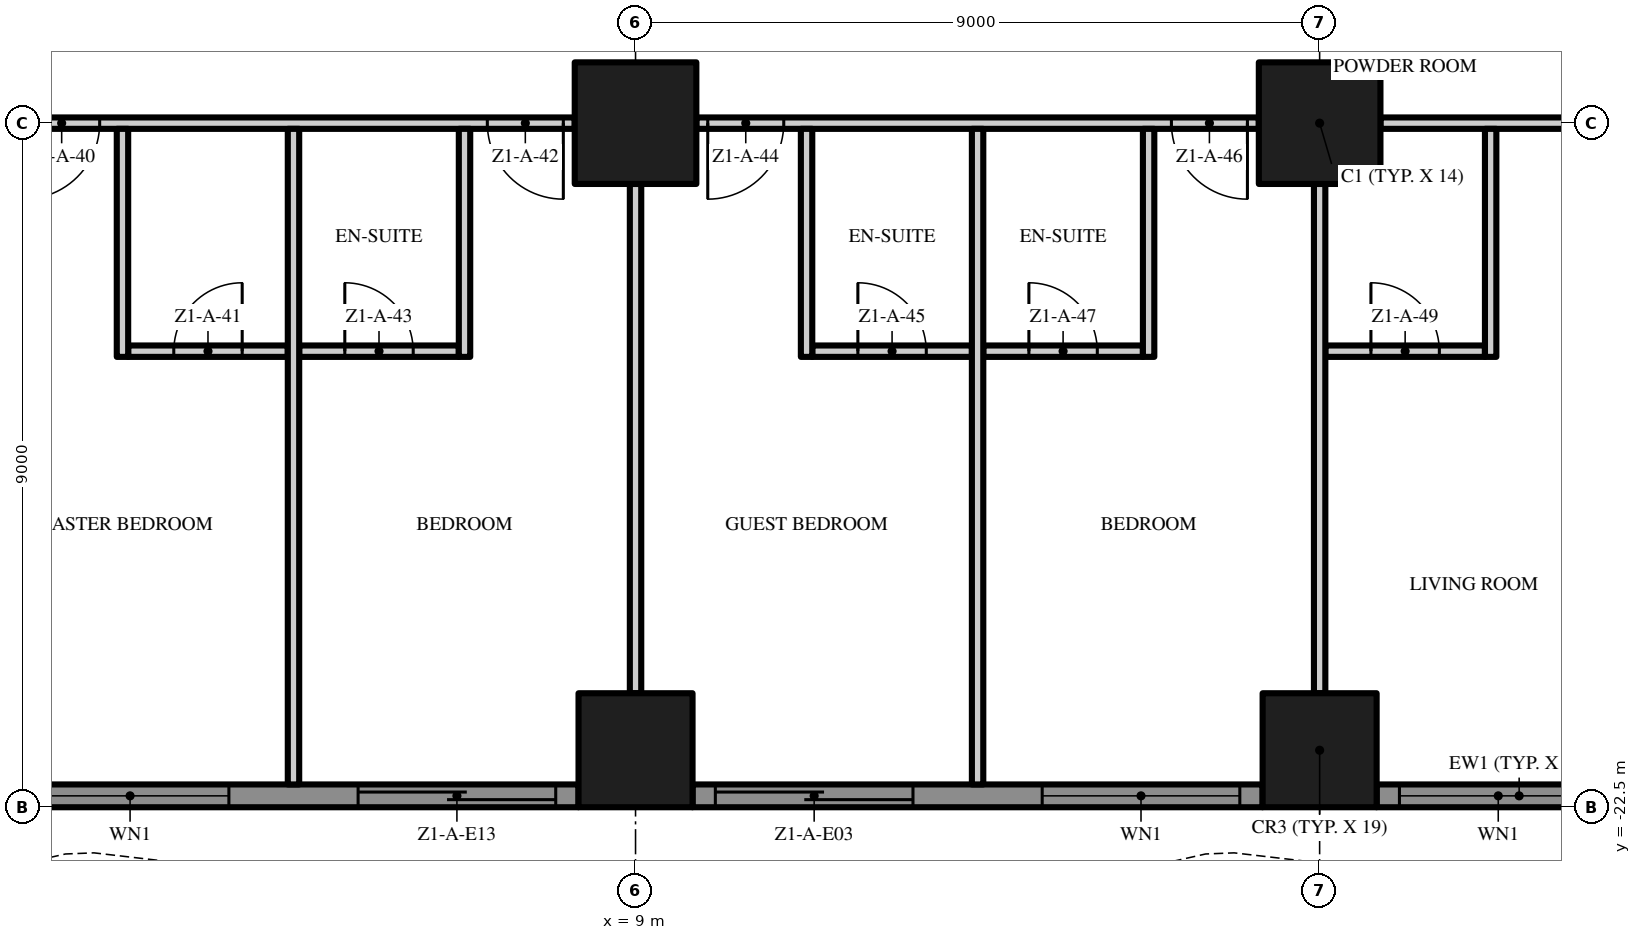
"""IFC4 building model, lengths in metres.
Left out: names, types, materials, properties, quantities, classifications, styles, units other than length and angle.
Written with IfcOpenShell. Run it as: python <this file> out.ifc"""

import sys

from ifc_helpers import new_model, si_unit, direction, frame, frame_2d, origin, origin_2d, place, context, subcontext, project, spatial, polyline, rectangle, outline, extrude, element, fill, save


model = new_model("IFC4")
c1 = context("Model", 3, precision=1e-05, world=origin(), true_north=direction((0.0, 1.0)))
c2 = subcontext(c1, "Body", "Model", "MODEL_VIEW")
j1 = project(units=[si_unit("LENGTHUNIT", "METRE"), si_unit("PLANEANGLEUNIT", "RADIAN")], contexts=[c1])
p1 = place(None, origin())
s1 = spatial("IfcSite", under=j1, at=p1, CompositionType="ELEMENT")
p2 = place(p1, origin())
s2 = spatial("IfcBuilding", under=s1, at=p2, CompositionType="ELEMENT")
p3 = place(p2, frame((0.0, 0.0, 18.8)))
s3 = spatial("IfcBuildingStorey", under=s2, at=p3, CompositionType="ELEMENT", Elevation=18.8)
p4 = place(p3, frame((18.0, -13.5, 0.0), z_axis=(0.0, 0.0, 1.0), x_axis=(1.0, 0.0, 0.0)))
e1 = element("IfcColumn", 1, at=p4, inside=s3, PredefinedType="COLUMN", context=c2, shape_type="SweptSolid", body=[
    extrude(rectangle(XDim=1.6, YDim=1.6, at=origin_2d()), origin(), (0.0, 0.0, 1.0), 3.5),
])
p5 = place(p3, frame((18.0, -21.75, 0.0), z_axis=(0.0, 0.0, 1.0), x_axis=(1.0, 0.0, 0.0)))
e2 = element("IfcColumn", 2, at=p5, inside=s3, PredefinedType="COLUMN", context=c2, shape_type="SweptSolid", body=[
    extrude(rectangle(XDim=1.5, YDim=1.5, at=origin_2d()), origin(), (0.0, 0.0, 1.0), 3.5),
])
p6 = place(p3, frame((9.0, -13.5, 0.0), z_axis=(0.0, 0.0, 1.0), x_axis=(1.0, 0.0, 0.0)))
e3 = element("IfcColumn", 3, at=p6, inside=s3, PredefinedType="COLUMN", context=c2, shape_type="SweptSolid", body=[
    extrude(rectangle(XDim=1.6, YDim=1.6, at=origin_2d()), origin(), (0.0, 0.0, 1.0), 3.5),
])
p7 = place(p3, frame((9.0, -21.75, 0.0), z_axis=(0.0, 0.0, 1.0), x_axis=(1.0, 0.0, 0.0)))
e4 = element("IfcColumn", 4, at=p7, inside=s3, PredefinedType="COLUMN", context=c2, shape_type="SweptSolid", body=[
    extrude(rectangle(XDim=1.5, YDim=1.5, at=origin_2d()), origin(), (0.0, 0.0, 1.0), 3.5),
])
p8 = place(p3, frame((8.25, -22.35, 0.0), z_axis=(0.0, 0.0, 1.0), x_axis=(-1.0, 0.0, 0.0)))
e5 = element("IfcWall", 5, at=p8, inside=s3, PredefinedType="SOLIDWALL", context=c2, shape_type="SweptSolid", body=[
    extrude(rectangle(XDim=7.5, YDim=0.3, at=frame_2d((3.75, 0.0))), origin(), (0.0, 0.0, 1.0), 3.5),
])
p9 = place(p8, frame((4.6, 0.0, 0.45)))
e6 = element("IfcOpeningElement", 6, at=p9, cuts=e5, PredefinedType="OPENING", context=c2, shape_type="SweptSolid", body=[
    extrude(rectangle(XDim=2.6, YDim=2.65, at=frame_2d((1.3, 1.325))), frame((0.0, 0.16, 0.0), z_axis=(0.0, -1.0, 0.0), x_axis=(1.0, 0.0, 0.0)), (0.0, 0.0, 1.0), 0.32),
])
p10 = place(p8, frame((0.3, 0.0, 0.0)))
e7 = element("IfcOpeningElement", 7, at=p10, cuts=e5, PredefinedType="OPENING", context=c2, shape_type="SweptSolid", body=[
    extrude(rectangle(XDim=2.6, YDim=2.4, at=frame_2d((1.3, 1.2))), frame((0.0, 0.16, 0.0), z_axis=(0.0, -1.0, 0.0), x_axis=(1.0, 0.0, 0.0)), (0.0, 0.0, 1.0), 0.32),
])
p11 = place(p3, frame((17.25, -22.35, 0.0), z_axis=(0.0, 0.0, 1.0), x_axis=(-1.0, 0.0, 0.0)))
e8 = element("IfcWall", 8, at=p11, inside=s3, PredefinedType="SOLIDWALL", context=c2, shape_type="SweptSolid", body=[
    extrude(rectangle(XDim=7.5, YDim=0.3, at=frame_2d((3.75, 0.0))), origin(), (0.0, 0.0, 1.0), 3.5),
])
p12 = place(p11, frame((4.6, 0.0, 0.0)))
e9 = element("IfcOpeningElement", 9, at=p12, cuts=e8, PredefinedType="OPENING", context=c2, shape_type="SweptSolid", body=[
    extrude(rectangle(XDim=2.6, YDim=2.4, at=frame_2d((1.3, 1.2))), frame((0.0, 0.16, 0.0), z_axis=(0.0, -1.0, 0.0), x_axis=(1.0, 0.0, 0.0)), (0.0, 0.0, 1.0), 0.32),
])
p13 = place(p11, frame((0.3, 0.0, 0.45)))
e10 = element("IfcOpeningElement", 10, at=p13, cuts=e8, PredefinedType="OPENING", context=c2, shape_type="SweptSolid", body=[
    extrude(rectangle(XDim=2.6, YDim=2.65, at=frame_2d((1.3, 1.325))), frame((0.0, 0.16, 0.0), z_axis=(0.0, -1.0, 0.0), x_axis=(1.0, 0.0, 0.0)), (0.0, 0.0, 1.0), 0.32),
])
p14 = place(p3, frame((22.5, -22.35, 0.0), z_axis=(0.0, 0.0, 1.0), x_axis=(-1.0, 0.0, 0.0)))
e11 = element("IfcWall", 11, at=p14, inside=s3, PredefinedType="SOLIDWALL", context=c2, shape_type="SweptSolid", body=[
    extrude(rectangle(XDim=3.75, YDim=0.3, at=frame_2d((1.875, 0.0))), origin(), (0.0, 0.0, 1.0), 3.5),
])
p15 = place(p14, frame((0.85, 0.0, 0.45)))
e12 = element("IfcOpeningElement", 12, at=p15, cuts=e11, PredefinedType="OPENING", context=c2, shape_type="SweptSolid", body=[
    extrude(rectangle(XDim=2.6, YDim=2.65, at=frame_2d((1.3, 1.325))), frame((0.0, 0.16, 0.0), z_axis=(0.0, -1.0, 0.0), x_axis=(1.0, 0.0, 0.0)), (0.0, 0.0, 1.0), 0.32),
])
p16 = place(p3, origin())
e13 = element("IfcWall", 13, at=p16, inside=s3, PredefinedType="USERDEFINED", context=c2, shape_type="SweptSolid", body=[
    extrude(outline(polyline([(-22.5, -25.149), (-21.0, -25.485), (-20.625, -25.5), (-19.5, -25.369), (-18.0, -24.845), (-16.5, -24.112), (-15.0, -23.451), (-13.5, -23.115), (-13.125, -23.1), (-12.0, -23.231), (-10.5, -23.755), (-9.0, -24.488), (-7.5, -25.149), (-6.0, -25.485), (-5.625, -25.5), (-4.5, -25.369), (-3.0, -24.845), (-1.5, -24.112), (0.0, -23.451), (1.5, -23.115), (1.875, -23.1), (3.0, -23.231), (4.5, -23.755), (6.0, -24.488), (7.5, -25.149), (9.0, -25.485), (9.375, -25.5), (10.5, -25.369), (12.0, -24.845), (13.5, -24.112), (15.0, -23.451), (16.5, -23.115), (16.875, -23.1), (18.0, -23.231), (19.5, -23.755), (21.0, -24.488), (22.5, -25.149), (22.601, -24.92), (21.105, -24.261), (19.596, -23.524), (18.056, -22.986), (16.885, -22.849), (16.467, -22.866), (14.921, -23.213), (13.395, -23.885), (11.904, -24.614), (10.444, -25.124), (9.365, -25.249), (9.033, -25.236), (7.579, -24.91), (6.105, -24.261), (4.596, -23.524), (3.056, -22.986), (1.885, -22.849), (1.467, -22.866), (-0.079, -23.213), (-1.605, -23.885), (-3.096, -24.614), (-4.556, -25.124), (-5.635, -25.249), (-5.967, -25.236), (-7.421, -24.91), (-8.895, -24.261), (-10.404, -23.524), (-11.944, -22.986), (-13.115, -22.849), (-13.533, -22.866), (-15.079, -23.213), (-16.605, -23.885), (-18.096, -24.614), (-19.556, -25.124), (-20.635, -25.249), (-20.967, -25.236), (-22.445, -24.905), (-22.5, -25.149)])), origin(), (0.0, 0.0, 1.0), 0.9),
])
p17 = place(p3, frame((2.325, -16.5, 0.0), z_axis=(0.0, 0.0, 1.0), x_axis=(1.0, 0.0, 0.0)))
e14 = element("IfcWall", 14, at=p17, inside=s3, PredefinedType="PARTITIONING", context=c2, shape_type="SweptSolid", body=[
    extrude(rectangle(XDim=2.1, YDim=0.15, at=frame_2d((1.05, 0.0))), origin(), (0.0, 0.0, 1.0), 3.5),
])
p18 = place(p17, frame((0.6, 0.0, 0.0)))
e15 = element("IfcOpeningElement", 15, at=p18, cuts=e14, PredefinedType="OPENING", context=c2, shape_type="SweptSolid", body=[
    extrude(rectangle(XDim=0.9, YDim=2.1, at=frame_2d((0.45, 1.05))), frame((0.0, 0.085, 0.0), z_axis=(0.0, -1.0, 0.0), x_axis=(1.0, 0.0, 0.0)), (0.0, 0.0, 1.0), 0.17),
])
p19 = place(p3, frame((4.575, -16.5, 0.0), z_axis=(0.0, 0.0, 1.0), x_axis=(1.0, 0.0, 0.0)))
e16 = element("IfcWall", 16, at=p19, inside=s3, PredefinedType="PARTITIONING", context=c2, shape_type="SweptSolid", body=[
    extrude(rectangle(XDim=2.1, YDim=0.15, at=frame_2d((1.05, 0.0))), origin(), (0.0, 0.0, 1.0), 3.5),
])
p20 = place(p19, frame((0.6, 0.0, 0.0)))
e17 = element("IfcOpeningElement", 17, at=p20, cuts=e16, PredefinedType="OPENING", context=c2, shape_type="SweptSolid", body=[
    extrude(rectangle(XDim=0.9, YDim=2.1, at=frame_2d((0.45, 1.05))), frame((0.0, 0.085, 0.0), z_axis=(0.0, -1.0, 0.0), x_axis=(1.0, 0.0, 0.0)), (0.0, 0.0, 1.0), 0.17),
])
p21 = place(p3, frame((11.325, -16.5, 0.0), z_axis=(0.0, 0.0, 1.0), x_axis=(1.0, 0.0, 0.0)))
e18 = element("IfcWall", 18, at=p21, inside=s3, PredefinedType="PARTITIONING", context=c2, shape_type="SweptSolid", body=[
    extrude(rectangle(XDim=2.1, YDim=0.15, at=frame_2d((1.05, 0.0))), origin(), (0.0, 0.0, 1.0), 3.5),
])
p22 = place(p21, frame((0.6, 0.0, 0.0)))
e19 = element("IfcOpeningElement", 19, at=p22, cuts=e18, PredefinedType="OPENING", context=c2, shape_type="SweptSolid", body=[
    extrude(rectangle(XDim=0.9, YDim=2.1, at=frame_2d((0.45, 1.05))), frame((0.0, 0.085, 0.0), z_axis=(0.0, -1.0, 0.0), x_axis=(1.0, 0.0, 0.0)), (0.0, 0.0, 1.0), 0.17),
])
p23 = place(p3, frame((13.575, -16.5, 0.0), z_axis=(0.0, 0.0, 1.0), x_axis=(1.0, 0.0, 0.0)))
e20 = element("IfcWall", 20, at=p23, inside=s3, PredefinedType="PARTITIONING", context=c2, shape_type="SweptSolid", body=[
    extrude(rectangle(XDim=2.1, YDim=0.15, at=frame_2d((1.05, 0.0))), origin(), (0.0, 0.0, 1.0), 3.5),
])
p24 = place(p23, frame((0.6, 0.0, 0.0)))
e21 = element("IfcOpeningElement", 21, at=p24, cuts=e20, PredefinedType="OPENING", context=c2, shape_type="SweptSolid", body=[
    extrude(rectangle(XDim=0.9, YDim=2.1, at=frame_2d((0.45, 1.05))), frame((0.0, 0.085, 0.0), z_axis=(0.0, -1.0, 0.0), x_axis=(1.0, 0.0, 0.0)), (0.0, 0.0, 1.0), 0.17),
])
p25 = place(p3, frame((18.075, -16.5, 0.0), z_axis=(0.0, 0.0, 1.0), x_axis=(1.0, 0.0, 0.0)))
e22 = element("IfcWall", 22, at=p25, inside=s3, PredefinedType="PARTITIONING", context=c2, shape_type="SweptSolid", body=[
    extrude(rectangle(XDim=2.1, YDim=0.15, at=frame_2d((1.05, 0.0))), origin(), (0.0, 0.0, 1.0), 3.5),
])
p26 = place(p25, frame((0.6, 0.0, 0.0)))
e23 = element("IfcOpeningElement", 23, at=p26, cuts=e22, PredefinedType="OPENING", context=c2, shape_type="SweptSolid", body=[
    extrude(rectangle(XDim=0.9, YDim=2.1, at=frame_2d((0.45, 1.05))), frame((0.0, 0.085, 0.0), z_axis=(0.0, -1.0, 0.0), x_axis=(1.0, 0.0, 0.0)), (0.0, 0.0, 1.0), 0.17),
])
p27 = place(p3, frame((8.2, -13.5, 0.0), z_axis=(0.0, 0.0, 1.0), x_axis=(-1.0, 0.0, 0.0)))
e24 = element("IfcWall", 24, at=p27, inside=s3, PredefinedType="PARTITIONING", context=c2, shape_type="SweptSolid", body=[
    extrude(rectangle(XDim=7.4, YDim=0.15, at=frame_2d((3.7, 0.0))), origin(), (0.0, 0.0, 1.0), 3.5),
])
p28 = place(p27, frame((6.25, 0.0, 0.0)))
e25 = element("IfcOpeningElement", 25, at=p28, cuts=e24, PredefinedType="OPENING", context=c2, shape_type="SweptSolid", body=[
    extrude(rectangle(XDim=1.0, YDim=2.4, at=frame_2d((0.5, 1.2))), frame((0.0, 0.085, 0.0), z_axis=(0.0, -1.0, 0.0), x_axis=(1.0, 0.0, 0.0)), (0.0, 0.0, 1.0), 0.17),
])
p29 = place(p27, frame((0.15, 0.0, 0.0)))
e26 = element("IfcOpeningElement", 26, at=p29, cuts=e24, PredefinedType="OPENING", context=c2, shape_type="SweptSolid", body=[
    extrude(rectangle(XDim=1.0, YDim=2.4, at=frame_2d((0.5, 1.2))), frame((0.0, 0.085, 0.0), z_axis=(0.0, -1.0, 0.0), x_axis=(1.0, 0.0, 0.0)), (0.0, 0.0, 1.0), 0.17),
])
p30 = place(p3, frame((17.2, -13.5, 0.0), z_axis=(0.0, 0.0, 1.0), x_axis=(-1.0, 0.0, 0.0)))
e27 = element("IfcWall", 27, at=p30, inside=s3, PredefinedType="PARTITIONING", context=c2, shape_type="SweptSolid", body=[
    extrude(rectangle(XDim=7.4, YDim=0.15, at=frame_2d((3.7, 0.0))), origin(), (0.0, 0.0, 1.0), 3.5),
])
p31 = place(p30, frame((6.25, 0.0, 0.0)))
e28 = element("IfcOpeningElement", 28, at=p31, cuts=e27, PredefinedType="OPENING", context=c2, shape_type="SweptSolid", body=[
    extrude(rectangle(XDim=1.0, YDim=2.4, at=frame_2d((0.5, 1.2))), frame((0.0, 0.085, 0.0), z_axis=(0.0, -1.0, 0.0), x_axis=(1.0, 0.0, 0.0)), (0.0, 0.0, 1.0), 0.17),
])
p32 = place(p30, frame((0.15, 0.0, 0.0)))
e29 = element("IfcOpeningElement", 29, at=p32, cuts=e27, PredefinedType="OPENING", context=c2, shape_type="SweptSolid", body=[
    extrude(rectangle(XDim=1.0, YDim=2.4, at=frame_2d((0.5, 1.2))), frame((0.0, 0.085, 0.0), z_axis=(0.0, -1.0, 0.0), x_axis=(1.0, 0.0, 0.0)), (0.0, 0.0, 1.0), 0.17),
])
p33 = place(p3, frame((25.5, -13.5, 0.0), z_axis=(0.0, 0.0, 1.0), x_axis=(-1.0, 0.0, 0.0)))
e30 = element("IfcWall", 30, at=p33, inside=s3, PredefinedType="PARTITIONING", context=c2, shape_type="SweptSolid", body=[
    extrude(rectangle(XDim=6.7, YDim=0.15, at=frame_2d((3.35, 0.0))), origin(), (0.0, 0.0, 1.0), 3.5),
])
p34 = place(p33, frame((1.0, 0.0, 0.0)))
e31 = element("IfcOpeningElement", 31, at=p34, cuts=e30, PredefinedType="OPENING", context=c2, shape_type="SweptSolid", body=[
    extrude(rectangle(XDim=1.8, YDim=2.4, at=frame_2d((0.9, 1.2))), frame((0.0, 0.085, 0.0), z_axis=(0.0, -1.0, 0.0), x_axis=(1.0, 0.0, 0.0)), (0.0, 0.0, 1.0), 0.17),
])
p35 = place(p3, frame((2.25, -16.575, 0.0), z_axis=(0.0, 0.0, 1.0), x_axis=(0.0, 1.0, 0.0)))
e32 = element("IfcWall", 32, at=p35, inside=s3, PredefinedType="PARTITIONING", context=c2, shape_type="SweptSolid", body=[
    extrude(rectangle(XDim=3.0, YDim=0.15, at=frame_2d((1.5, 0.0))), origin(), (0.0, 0.0, 1.0), 3.5),
])
p36 = place(p3, frame((4.5, -22.2, 0.0), z_axis=(0.0, 0.0, 1.0), x_axis=(0.0, 1.0, 0.0)))
e33 = element("IfcWall", 33, at=p36, inside=s3, PredefinedType="PARTITIONING", context=c2, shape_type="SweptSolid", body=[
    extrude(rectangle(XDim=8.625, YDim=0.15, at=frame_2d((4.312, 0.0))), origin(), (0.0, 0.0, 1.0), 3.5),
])
p37 = place(p3, frame((6.75, -16.575, 0.0), z_axis=(0.0, 0.0, 1.0), x_axis=(0.0, 1.0, 0.0)))
e34 = element("IfcWall", 34, at=p37, inside=s3, PredefinedType="PARTITIONING", context=c2, shape_type="SweptSolid", body=[
    extrude(rectangle(XDim=3.0, YDim=0.15, at=frame_2d((1.5, 0.0))), origin(), (0.0, 0.0, 1.0), 3.5),
])
p38 = place(p3, frame((9.0, -21.0, 0.0), z_axis=(0.0, 0.0, 1.0), x_axis=(0.0, 1.0, 0.0)))
e35 = element("IfcWall", 35, at=p38, inside=s3, PredefinedType="PARTITIONING", context=c2, shape_type="SweptSolid", body=[
    extrude(rectangle(XDim=6.7, YDim=0.15, at=frame_2d((3.35, 0.0))), origin(), (0.0, 0.0, 1.0), 3.5),
])
p39 = place(p3, frame((11.25, -16.575, 0.0), z_axis=(0.0, 0.0, 1.0), x_axis=(0.0, 1.0, 0.0)))
e36 = element("IfcWall", 36, at=p39, inside=s3, PredefinedType="PARTITIONING", context=c2, shape_type="SweptSolid", body=[
    extrude(rectangle(XDim=3.0, YDim=0.15, at=frame_2d((1.5, 0.0))), origin(), (0.0, 0.0, 1.0), 3.5),
])
p40 = place(p3, frame((13.5, -22.2, 0.0), z_axis=(0.0, 0.0, 1.0), x_axis=(0.0, 1.0, 0.0)))
e37 = element("IfcWall", 37, at=p40, inside=s3, PredefinedType="PARTITIONING", context=c2, shape_type="SweptSolid", body=[
    extrude(rectangle(XDim=8.625, YDim=0.15, at=frame_2d((4.312, 0.0))), origin(), (0.0, 0.0, 1.0), 3.5),
])
p41 = place(p3, frame((15.75, -16.575, 0.0), z_axis=(0.0, 0.0, 1.0), x_axis=(0.0, 1.0, 0.0)))
e38 = element("IfcWall", 38, at=p41, inside=s3, PredefinedType="PARTITIONING", context=c2, shape_type="SweptSolid", body=[
    extrude(rectangle(XDim=3.0, YDim=0.15, at=frame_2d((1.5, 0.0))), origin(), (0.0, 0.0, 1.0), 3.5),
])
p42 = place(p3, frame((18.0, -21.0, 0.0), z_axis=(0.0, 0.0, 1.0), x_axis=(0.0, 1.0, 0.0)))
e39 = element("IfcWall", 39, at=p42, inside=s3, PredefinedType="PARTITIONING", context=c2, shape_type="SweptSolid", body=[
    extrude(rectangle(XDim=6.7, YDim=0.15, at=frame_2d((3.35, 0.0))), origin(), (0.0, 0.0, 1.0), 3.5),
])
p43 = place(p3, frame((20.25, -16.575, 0.0), z_axis=(0.0, 0.0, 1.0), x_axis=(0.0, 1.0, 0.0)))
e40 = element("IfcWall", 40, at=p43, inside=s3, PredefinedType="PARTITIONING", context=c2, shape_type="SweptSolid", body=[
    extrude(rectangle(XDim=3.0, YDim=0.15, at=frame_2d((1.5, 0.0))), origin(), (0.0, 0.0, 1.0), 3.5),
])
p44 = place(p9, origin())
e41 = element("IfcWindow", 41, at=p44, inside=s3, PartitioningType="SINGLE_PANEL", PredefinedType="WINDOW", context=c2, shape_type="SweptSolid", body=[
    extrude(rectangle(XDim=2.6, YDim=2.65, at=frame_2d((1.3, 1.325))), frame((0.0, 0.03, 0.0), z_axis=(0.0, -1.0, 0.0), x_axis=(1.0, 0.0, 0.0)), (0.0, 0.0, 1.0), 0.06),
])
fill(e6, e41)
p45 = place(p10, origin())
e42 = element("IfcDoor", 42, at=p45, inside=s3, OperationType="SINGLE_SWING_LEFT", PredefinedType="DOOR", context=c2, shape_type="SweptSolid", body=[
    extrude(rectangle(XDim=2.6, YDim=2.4, at=frame_2d((1.3, 1.2))), frame((0.0, 0.025, 0.0), z_axis=(0.0, -1.0, 0.0), x_axis=(1.0, 0.0, 0.0)), (0.0, 0.0, 1.0), 0.05),
])
fill(e7, e42)
p46 = place(p12, origin())
e43 = element("IfcDoor", 43, at=p46, inside=s3, OperationType="SINGLE_SWING_LEFT", PredefinedType="DOOR", context=c2, shape_type="SweptSolid", body=[
    extrude(rectangle(XDim=2.6, YDim=2.4, at=frame_2d((1.3, 1.2))), frame((0.0, 0.025, 0.0), z_axis=(0.0, -1.0, 0.0), x_axis=(1.0, 0.0, 0.0)), (0.0, 0.0, 1.0), 0.05),
])
fill(e9, e43)
p47 = place(p13, origin())
e44 = element("IfcWindow", 44, at=p47, inside=s3, PartitioningType="SINGLE_PANEL", PredefinedType="WINDOW", context=c2, shape_type="SweptSolid", body=[
    extrude(rectangle(XDim=2.6, YDim=2.65, at=frame_2d((1.3, 1.325))), frame((0.0, 0.03, 0.0), z_axis=(0.0, -1.0, 0.0), x_axis=(1.0, 0.0, 0.0)), (0.0, 0.0, 1.0), 0.06),
])
fill(e10, e44)
p48 = place(p15, origin())
e45 = element("IfcWindow", 45, at=p48, inside=s3, PartitioningType="SINGLE_PANEL", PredefinedType="WINDOW", context=c2, shape_type="SweptSolid", body=[
    extrude(rectangle(XDim=2.6, YDim=2.65, at=frame_2d((1.3, 1.325))), frame((0.0, 0.03, 0.0), z_axis=(0.0, -1.0, 0.0), x_axis=(1.0, 0.0, 0.0)), (0.0, 0.0, 1.0), 0.06),
])
fill(e12, e45)
p49 = place(p28, origin())
e46 = element("IfcDoor", 46, at=p49, inside=s3, OperationType="SINGLE_SWING_RIGHT", PredefinedType="DOOR", context=c2, shape_type="SweptSolid", body=[
    extrude(rectangle(XDim=1.0, YDim=2.4, at=frame_2d((0.5, 1.2))), frame((0.0, 0.025, 0.0), z_axis=(0.0, -1.0, 0.0), x_axis=(1.0, 0.0, 0.0)), (0.0, 0.0, 1.0), 0.05),
])
fill(e25, e46)
p50 = place(p18, origin())
e47 = element("IfcDoor", 47, at=p50, inside=s3, OperationType="SINGLE_SWING_RIGHT", PredefinedType="DOOR", context=c2, shape_type="SweptSolid", body=[
    extrude(rectangle(XDim=0.9, YDim=2.1, at=frame_2d((0.45, 1.05))), frame((0.0, 0.025, 0.0), z_axis=(0.0, -1.0, 0.0), x_axis=(1.0, 0.0, 0.0)), (0.0, 0.0, 1.0), 0.05),
])
fill(e15, e47)
p51 = place(p29, origin())
e48 = element("IfcDoor", 48, at=p51, inside=s3, OperationType="SINGLE_SWING_LEFT", PredefinedType="DOOR", context=c2, shape_type="SweptSolid", body=[
    extrude(rectangle(XDim=1.0, YDim=2.4, at=frame_2d((0.5, 1.2))), frame((0.0, 0.025, 0.0), z_axis=(0.0, -1.0, 0.0), x_axis=(1.0, 0.0, 0.0)), (0.0, 0.0, 1.0), 0.05),
])
fill(e26, e48)
p52 = place(p20, origin())
e49 = element("IfcDoor", 49, at=p52, inside=s3, OperationType="SINGLE_SWING_LEFT", PredefinedType="DOOR", context=c2, shape_type="SweptSolid", body=[
    extrude(rectangle(XDim=0.9, YDim=2.1, at=frame_2d((0.45, 1.05))), frame((0.0, 0.025, 0.0), z_axis=(0.0, -1.0, 0.0), x_axis=(1.0, 0.0, 0.0)), (0.0, 0.0, 1.0), 0.05),
])
fill(e17, e49)
p53 = place(p31, origin())
e50 = element("IfcDoor", 50, at=p53, inside=s3, OperationType="SINGLE_SWING_RIGHT", PredefinedType="DOOR", context=c2, shape_type="SweptSolid", body=[
    extrude(rectangle(XDim=1.0, YDim=2.4, at=frame_2d((0.5, 1.2))), frame((0.0, 0.025, 0.0), z_axis=(0.0, -1.0, 0.0), x_axis=(1.0, 0.0, 0.0)), (0.0, 0.0, 1.0), 0.05),
])
fill(e28, e50)
p54 = place(p22, origin())
e51 = element("IfcDoor", 51, at=p54, inside=s3, OperationType="SINGLE_SWING_LEFT", PredefinedType="DOOR", context=c2, shape_type="SweptSolid", body=[
    extrude(rectangle(XDim=0.9, YDim=2.1, at=frame_2d((0.45, 1.05))), frame((0.0, 0.025, 0.0), z_axis=(0.0, -1.0, 0.0), x_axis=(1.0, 0.0, 0.0)), (0.0, 0.0, 1.0), 0.05),
])
fill(e19, e51)
p55 = place(p32, origin())
e52 = element("IfcDoor", 52, at=p55, inside=s3, OperationType="SINGLE_SWING_LEFT", PredefinedType="DOOR", context=c2, shape_type="SweptSolid", body=[
    extrude(rectangle(XDim=1.0, YDim=2.4, at=frame_2d((0.5, 1.2))), frame((0.0, 0.025, 0.0), z_axis=(0.0, -1.0, 0.0), x_axis=(1.0, 0.0, 0.0)), (0.0, 0.0, 1.0), 0.05),
])
fill(e29, e52)
p56 = place(p24, origin())
e53 = element("IfcDoor", 53, at=p56, inside=s3, OperationType="SINGLE_SWING_LEFT", PredefinedType="DOOR", context=c2, shape_type="SweptSolid", body=[
    extrude(rectangle(XDim=0.9, YDim=2.1, at=frame_2d((0.45, 1.05))), frame((0.0, 0.025, 0.0), z_axis=(0.0, -1.0, 0.0), x_axis=(1.0, 0.0, 0.0)), (0.0, 0.0, 1.0), 0.05),
])
fill(e21, e53)
p57 = place(p26, origin())
e54 = element("IfcDoor", 54, at=p57, inside=s3, OperationType="SINGLE_SWING_LEFT", PredefinedType="DOOR", context=c2, shape_type="SweptSolid", body=[
    extrude(rectangle(XDim=0.9, YDim=2.1, at=frame_2d((0.45, 1.05))), frame((0.0, 0.025, 0.0), z_axis=(0.0, -1.0, 0.0), x_axis=(1.0, 0.0, 0.0)), (0.0, 0.0, 1.0), 0.05),
])
fill(e23, e54)
save(model, sys.argv[1])
